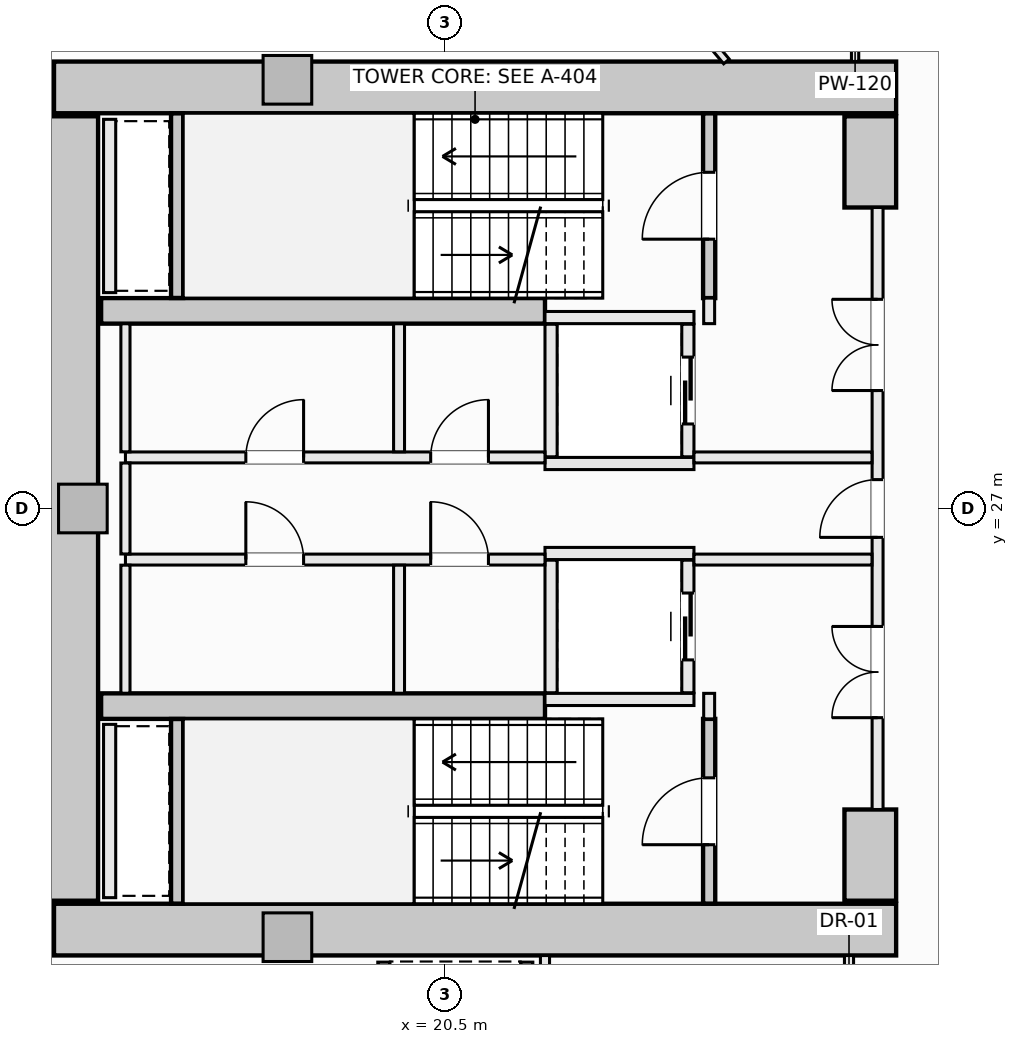
"""IFC4 building model, lengths in metres.
Left out: names, types, materials, properties, quantities, classifications, styles, units other than length and angle.
Written with IfcOpenShell. Run it as: python <this file> out.ifc"""

import sys

from ifc_helpers import new_model, si_unit, direction, frame, frame_2d, origin, origin_2d, place, context, subcontext, project, spatial, rectangle, extrude, element, fill, save


model = new_model("IFC4")
c1 = context("Model", 3, precision=1e-05, world=origin(), true_north=direction((0.0, 1.0)))
c2 = subcontext(c1, "Body", "Model", "MODEL_VIEW")
j1 = project(units=[si_unit("LENGTHUNIT", "METRE"), si_unit("PLANEANGLEUNIT", "RADIAN")], contexts=[c1])
p1 = place(None, origin())
s1 = spatial("IfcSite", under=j1, at=p1, CompositionType="ELEMENT")
p2 = place(p1, origin())
s2 = spatial("IfcBuilding", under=s1, at=p2, CompositionType="ELEMENT")
p3 = place(p2, frame((0.0, 0.0, 80.4)))
s3 = spatial("IfcBuildingStorey", under=s2, at=p3, CompositionType="ELEMENT", Elevation=80.4)
for number, where, z_axis, x_axis in (
    (1, (14.075, 33.925, -0.28), (0.0, 0.0, 1.0), (1.0, 0.0, 0.0)),
    (2, (14.075, 20.075, -0.28), (0.0, 0.0, 1.0), (1.0, 0.0, 0.0)),
):
    element("IfcWall", number, at=place(p3, frame(where, z_axis=z_axis, x_axis=x_axis)), inside=s3, PredefinedType="SHEAR", context=c2, shape_type="SweptSolid", body=[
        extrude(rectangle(XDim=13.85, YDim=0.85, at=frame_2d((6.925, 0.0))), origin(), (0.0, 0.0, 1.0), 3.85),
    ])
p4 = place(p3, frame((14.375, 20.55, -0.28), z_axis=(0.0, 0.0, 1.0), x_axis=(0.0, 1.0, 0.0)))
e3 = element("IfcWall", 3, at=p4, inside=s3, PredefinedType="SHEAR", context=c2, shape_type="SweptSolid", body=[
    extrude(rectangle(XDim=12.9, YDim=0.85, at=frame_2d((6.45, 0.0))), origin(), (0.0, 0.0, 1.0), 3.85),
])
for number, where, z_axis, x_axis in (
    (4, (27.5, 31.95, -0.28), (0.0, 0.0, 1.0), (0.0, 1.0, 0.0)),
    (5, (27.5, 20.55, -0.28), (0.0, 0.0, 1.0), (0.0, 1.0, 0.0)),
):
    element("IfcWall", number, at=place(p3, frame(where, z_axis=z_axis, x_axis=x_axis)), inside=s3, PredefinedType="SHEAR", context=c2, shape_type="SweptSolid", body=[
        extrude(rectangle(XDim=1.5, YDim=0.85, at=frame_2d((0.75, 0.0))), origin(), (0.0, 0.0, 1.0), 3.85),
    ])
for number, where, z_axis, x_axis in (
    (6, (14.85, 30.25, -0.28), (0.0, 0.0, 1.0), (1.0, 0.0, 0.0)),
    (7, (14.85, 23.75, -0.28), (0.0, 0.0, 1.0), (1.0, 0.0, 0.0)),
):
    element("IfcWall", number, at=place(p3, frame(where, z_axis=z_axis, x_axis=x_axis)), inside=s3, PredefinedType="SHEAR", context=c2, shape_type="SweptSolid", body=[
        extrude(rectangle(XDim=7.3, YDim=0.42, at=frame_2d((3.65, 0.0))), origin(), (0.0, 0.0, 1.0), 3.85),
    ])
for number, where, z_axis, x_axis in (
    (8, (17.914, 34.05, -0.28), (0.0, 0.0, 1.0), (1.0, 0.0, 0.0)),
    (9, (14.55, 27.0, -0.28), (0.0, 0.0, 1.0), (1.0, 0.0, 0.0)),
    (10, (17.914, 19.95, -0.28), (0.0, 0.0, 1.0), (1.0, 0.0, 0.0)),
):
    element("IfcColumn", number, at=place(p3, frame(where, z_axis=z_axis, x_axis=x_axis)), inside=s3, PredefinedType="PILASTER", context=c2, shape_type="SweptSolid", body=[
        extrude(rectangle(XDim=0.8, YDim=0.8, at=origin_2d()), origin(), (0.0, 0.0, 1.0), 3.85),
    ])
p5 = place(p3, frame((24.85, 30.46, -0.28), z_axis=(0.0, 0.0, 1.0), x_axis=(0.0, 1.0, 0.0)))
e11 = element("IfcWall", 11, at=p5, inside=s3, PredefinedType="SHEAR", context=c2, shape_type="SweptSolid", body=[
    extrude(rectangle(XDim=3.038, YDim=0.2, at=frame_2d((1.519, 0.0))), origin(), (0.0, 0.0, 1.0), 3.85),
])
p6 = place(p5, frame((0.969, 0.0, 0.28)))
e12 = element("IfcOpeningElement", 12, at=p6, cuts=e11, PredefinedType="OPENING", context=c2, shape_type="SweptSolid", body=[
    extrude(rectangle(XDim=1.1, YDim=2.15, at=frame_2d((0.55, 1.075))), frame((0.0, 0.11, 0.0), z_axis=(0.0, -1.0, 0.0), x_axis=(1.0, 0.0, 0.0)), (0.0, 0.0, 1.0), 0.22),
])
p7 = place(p3, frame((16.1, 30.462, -0.28), z_axis=(0.0, 0.0, 1.0), x_axis=(0.0, 1.0, 0.0)))
e13 = element("IfcWall", 13, at=p7, inside=s3, PredefinedType="SHEAR", context=c2, shape_type="SweptSolid", body=[
    extrude(rectangle(XDim=3.036, YDim=0.2, at=frame_2d((1.518, 0.0))), origin(), (0.0, 0.0, 1.0), 3.85),
])
p8 = place(p3, frame((24.85, 20.502, -0.28), z_axis=(0.0, 0.0, 1.0), x_axis=(0.0, 1.0, 0.0)))
e14 = element("IfcWall", 14, at=p8, inside=s3, PredefinedType="SHEAR", context=c2, shape_type="SweptSolid", body=[
    extrude(rectangle(XDim=3.038, YDim=0.2, at=frame_2d((1.519, 0.0))), origin(), (0.0, 0.0, 1.0), 3.85),
])
p9 = place(p8, frame((0.969, 0.0, 0.28)))
e15 = element("IfcOpeningElement", 15, at=p9, cuts=e14, PredefinedType="OPENING", context=c2, shape_type="SweptSolid", body=[
    extrude(rectangle(XDim=1.1, YDim=2.15, at=frame_2d((0.55, 1.075))), frame((0.0, 0.11, 0.0), z_axis=(0.0, -1.0, 0.0), x_axis=(1.0, 0.0, 0.0)), (0.0, 0.0, 1.0), 0.22),
])
p10 = place(p3, frame((16.1, 20.502, -0.28), z_axis=(0.0, 0.0, 1.0), x_axis=(0.0, 1.0, 0.0)))
e16 = element("IfcWall", 16, at=p10, inside=s3, PredefinedType="SHEAR", context=c2, shape_type="SweptSolid", body=[
    extrude(rectangle(XDim=3.036, YDim=0.2, at=frame_2d((1.518, 0.0))), origin(), (0.0, 0.0, 1.0), 3.85),
])
for number, where, z_axis, x_axis in (
    (17, (22.15, 30.14, 0.0), (0.0, 0.0, 1.0), (1.0, 0.0, 0.0)),
    (18, (22.15, 27.74, 0.0), (0.0, 0.0, 1.0), (1.0, 0.0, 0.0)),
):
    element("IfcWall", number, at=place(p3, frame(where, z_axis=z_axis, x_axis=x_axis)), inside=s3, PredefinedType="SOLIDWALL", context=c2, shape_type="SweptSolid", body=[
        extrude(rectangle(XDim=2.45, YDim=0.2, at=frame_2d((1.225, 0.0))), origin(), (0.0, 0.0, 1.0), 3.57),
    ])
p11 = place(p3, frame((22.25, 27.85, 0.0), z_axis=(0.0, 0.0, 1.0), x_axis=(0.0, 1.0, 0.0)))
e19 = element("IfcWall", 19, at=p11, inside=s3, PredefinedType="SOLIDWALL", context=c2, shape_type="SweptSolid", body=[
    extrude(rectangle(XDim=2.18, YDim=0.2, at=frame_2d((1.09, 0.0))), origin(), (0.0, 0.0, 1.0), 3.57),
])
p12 = place(p3, frame((24.5, 27.85, 0.0), z_axis=(0.0, 0.0, 1.0), x_axis=(0.0, 1.0, 0.0)))
e20 = element("IfcWall", 20, at=p12, inside=s3, PredefinedType="SOLIDWALL", context=c2, shape_type="SweptSolid", body=[
    extrude(rectangle(XDim=2.18, YDim=0.2, at=frame_2d((1.09, 0.0))), origin(), (0.0, 0.0, 1.0), 3.57),
])
p13 = place(p12, frame((0.54, 0.0, 0.0)))
e21 = element("IfcOpeningElement", 21, at=p13, cuts=e20, PredefinedType="OPENING", context=c2, shape_type="SweptSolid", body=[
    extrude(rectangle(XDim=1.1, YDim=2.2, at=frame_2d((0.55, 1.1))), frame((0.0, 0.11, 0.0), z_axis=(0.0, -1.0, 0.0), x_axis=(1.0, 0.0, 0.0)), (0.0, 0.0, 1.0), 0.22),
])
for number, where, z_axis, x_axis in (
    (22, (22.15, 26.26, 0.0), (0.0, 0.0, 1.0), (1.0, 0.0, 0.0)),
    (23, (22.15, 23.86, 0.0), (0.0, 0.0, 1.0), (1.0, 0.0, 0.0)),
):
    element("IfcWall", number, at=place(p3, frame(where, z_axis=z_axis, x_axis=x_axis)), inside=s3, PredefinedType="SOLIDWALL", context=c2, shape_type="SweptSolid", body=[
        extrude(rectangle(XDim=2.45, YDim=0.2, at=frame_2d((1.225, 0.0))), origin(), (0.0, 0.0, 1.0), 3.57),
    ])
p14 = place(p3, frame((22.25, 23.97, 0.0), z_axis=(0.0, 0.0, 1.0), x_axis=(0.0, 1.0, 0.0)))
e24 = element("IfcWall", 24, at=p14, inside=s3, PredefinedType="SOLIDWALL", context=c2, shape_type="SweptSolid", body=[
    extrude(rectangle(XDim=2.18, YDim=0.2, at=frame_2d((1.09, 0.0))), origin(), (0.0, 0.0, 1.0), 3.57),
])
p15 = place(p3, frame((24.5, 23.97, 0.0), z_axis=(0.0, 0.0, 1.0), x_axis=(0.0, 1.0, 0.0)))
e25 = element("IfcWall", 25, at=p15, inside=s3, PredefinedType="SOLIDWALL", context=c2, shape_type="SweptSolid", body=[
    extrude(rectangle(XDim=2.18, YDim=0.2, at=frame_2d((1.09, 0.0))), origin(), (0.0, 0.0, 1.0), 3.57),
])
p16 = place(p15, frame((0.54, 0.0, 0.0)))
e26 = element("IfcOpeningElement", 26, at=p16, cuts=e25, PredefinedType="OPENING", context=c2, shape_type="SweptSolid", body=[
    extrude(rectangle(XDim=1.1, YDim=2.2, at=frame_2d((0.55, 1.1))), frame((0.0, 0.11, 0.0), z_axis=(0.0, -1.0, 0.0), x_axis=(1.0, 0.0, 0.0)), (0.0, 0.0, 1.0), 0.22),
])
for number, where, z_axis, x_axis in (
    (27, (19.5, 17.01, 0.0), (0.0, 0.0, 1.0), (0.0, 1.0, 0.0)),
    (28, (21.85, 17.01, 0.0), (0.0, 0.0, 1.0), (0.0, 1.0, 0.0)),
):
    element("IfcWall", number, at=place(p3, frame(where, z_axis=z_axis, x_axis=x_axis)), inside=s3, PredefinedType="SOLIDWALL", context=c2, shape_type="SweptSolid", body=[
        extrude(rectangle(XDim=2.53, YDim=0.2, at=frame_2d((1.265, 0.0))), origin(), (0.0, 0.0, 1.0), 3.57),
    ])
for number, where, z_axis, x_axis in (
    (29, (14.99, 30.55, 0.0), (0.0, 0.0, 1.0), (0.0, 1.0, 0.0)),
    (30, (14.99, 20.6, 0.0), (0.0, 0.0, 1.0), (0.0, 1.0, 0.0)),
):
    element("IfcWall", number, at=place(p3, frame(where, z_axis=z_axis, x_axis=x_axis)), inside=s3, PredefinedType="SOLIDWALL", context=c2, shape_type="SweptSolid", body=[
        extrude(rectangle(XDim=2.85, YDim=0.2, at=frame_2d((1.425, 0.0))), origin(), (0.0, 0.0, 1.0), 3.57),
    ])
for number, where, z_axis, x_axis in (
    (31, (24.85, 23.54, 0.0), (0.0, 0.0, 1.0), (0.0, 1.0, 0.0)),
    (32, (24.85, 30.04, 0.0), (0.0, 0.0, 1.0), (0.0, 1.0, 0.0)),
):
    element("IfcWall", number, at=place(p3, frame(where, z_axis=z_axis, x_axis=x_axis)), inside=s3, PredefinedType="SOLIDWALL", context=c2, shape_type="SweptSolid", body=[
        extrude(rectangle(XDim=0.42, YDim=0.18, at=frame_2d((0.21, 0.0))), origin(), (0.0, 0.0, 1.0), 3.57),
    ])
p17 = place(p3, frame((27.62, 22.05, 0.0), z_axis=(0.0, 0.0, 1.0), x_axis=(0.0, 1.0, 0.0)))
e33 = element("IfcWall", 33, at=p17, inside=s3, PredefinedType="SOLIDWALL", context=c2, shape_type="SweptSolid", body=[
    extrude(rectangle(XDim=9.9, YDim=0.18, at=frame_2d((4.95, 0.0))), origin(), (0.0, 0.0, 1.0), 2.662),
])
p18 = place(p17, frame((4.475, 0.0, 0.0)))
e34 = element("IfcOpeningElement", 34, at=p18, cuts=e33, PredefinedType="OPENING", context=c2, shape_type="SweptSolid", body=[
    extrude(rectangle(XDim=0.95, YDim=2.1, at=frame_2d((0.475, 1.05))), frame((0.0, 0.1, 0.0), z_axis=(0.0, -1.0, 0.0), x_axis=(1.0, 0.0, 0.0)), (0.0, 0.0, 1.0), 0.2),
])
p19 = place(p17, frame((6.89, 0.0, 0.0)))
e35 = element("IfcOpeningElement", 35, at=p19, cuts=e33, PredefinedType="OPENING", context=c2, shape_type="SweptSolid", body=[
    extrude(rectangle(XDim=1.5, YDim=2.2, at=frame_2d((0.75, 1.1))), frame((0.0, 0.1, 0.0), z_axis=(0.0, -1.0, 0.0), x_axis=(1.0, 0.0, 0.0)), (0.0, 0.0, 1.0), 0.2),
])
p20 = place(p17, frame((1.51, 0.0, 0.0)))
e36 = element("IfcOpeningElement", 36, at=p20, cuts=e33, PredefinedType="OPENING", context=c2, shape_type="SweptSolid", body=[
    extrude(rectangle(XDim=1.5, YDim=2.2, at=frame_2d((0.75, 1.1))), frame((0.0, 0.1, 0.0), z_axis=(0.0, -1.0, 0.0), x_axis=(1.0, 0.0, 0.0)), (0.0, 0.0, 1.0), 0.2),
])
p21 = place(p3, frame((15.25, 27.84, 0.0), z_axis=(0.0, 0.0, 1.0), x_axis=(1.0, 0.0, 0.0)))
e37 = element("IfcWall", 37, at=p21, inside=s3, PredefinedType="SOLIDWALL", context=c2, shape_type="SweptSolid", body=[
    extrude(rectangle(XDim=6.9, YDim=0.18, at=frame_2d((3.45, 0.0))), origin(), (0.0, 0.0, 1.0), 3.57),
])
p22 = place(p21, frame((5.02, 0.0, 0.0)))
e38 = element("IfcOpeningElement", 38, at=p22, cuts=e37, PredefinedType="OPENING", context=c2, shape_type="SweptSolid", body=[
    extrude(rectangle(XDim=0.95, YDim=2.1, at=frame_2d((0.475, 1.05))), frame((0.0, 0.1, 0.0), z_axis=(0.0, -1.0, 0.0), x_axis=(1.0, 0.0, 0.0)), (0.0, 0.0, 1.0), 0.2),
])
p23 = place(p21, frame((1.98, 0.0, 0.0)))
e39 = element("IfcOpeningElement", 39, at=p23, cuts=e37, PredefinedType="OPENING", context=c2, shape_type="SweptSolid", body=[
    extrude(rectangle(XDim=0.95, YDim=2.1, at=frame_2d((0.475, 1.05))), frame((0.0, 0.1, 0.0), z_axis=(0.0, -1.0, 0.0), x_axis=(1.0, 0.0, 0.0)), (0.0, 0.0, 1.0), 0.2),
])
p24 = place(p3, frame((24.6, 27.84, 0.0), z_axis=(0.0, 0.0, 1.0), x_axis=(1.0, 0.0, 0.0)))
e40 = element("IfcWall", 40, at=p24, inside=s3, PredefinedType="SOLIDWALL", context=c2, shape_type="SweptSolid", body=[
    extrude(rectangle(XDim=2.928, YDim=0.18, at=frame_2d((1.464, 0.0))), origin(), (0.0, 0.0, 1.0), 3.57),
])
p25 = place(p3, frame((15.25, 26.16, 0.0), z_axis=(0.0, 0.0, 1.0), x_axis=(1.0, 0.0, 0.0)))
e41 = element("IfcWall", 41, at=p25, inside=s3, PredefinedType="SOLIDWALL", context=c2, shape_type="SweptSolid", body=[
    extrude(rectangle(XDim=6.9, YDim=0.18, at=frame_2d((3.45, 0.0))), origin(), (0.0, 0.0, 1.0), 3.57),
])
p26 = place(p25, frame((5.02, 0.0, 0.0)))
e42 = element("IfcOpeningElement", 42, at=p26, cuts=e41, PredefinedType="OPENING", context=c2, shape_type="SweptSolid", body=[
    extrude(rectangle(XDim=0.95, YDim=2.1, at=frame_2d((0.475, 1.05))), frame((0.0, 0.1, 0.0), z_axis=(0.0, -1.0, 0.0), x_axis=(1.0, 0.0, 0.0)), (0.0, 0.0, 1.0), 0.2),
])
p27 = place(p25, frame((1.98, 0.0, 0.0)))
e43 = element("IfcOpeningElement", 43, at=p27, cuts=e41, PredefinedType="OPENING", context=c2, shape_type="SweptSolid", body=[
    extrude(rectangle(XDim=0.95, YDim=2.1, at=frame_2d((0.475, 1.05))), frame((0.0, 0.1, 0.0), z_axis=(0.0, -1.0, 0.0), x_axis=(1.0, 0.0, 0.0)), (0.0, 0.0, 1.0), 0.2),
])
p28 = place(p3, frame((24.6, 26.16, 0.0), z_axis=(0.0, 0.0, 1.0), x_axis=(1.0, 0.0, 0.0)))
e44 = element("IfcWall", 44, at=p28, inside=s3, PredefinedType="SOLIDWALL", context=c2, shape_type="SweptSolid", body=[
    extrude(rectangle(XDim=2.928, YDim=0.18, at=frame_2d((1.464, 0.0))), origin(), (0.0, 0.0, 1.0), 3.57),
])
p29 = place(p3, frame((15.25, 23.962, 0.0), z_axis=(0.0, 0.0, 1.0), x_axis=(0.0, 1.0, 0.0)))
e45 = element("IfcWall", 45, at=p29, inside=s3, PredefinedType="PARTITIONING", context=c2, shape_type="SweptSolid", body=[
    extrude(rectangle(XDim=2.106, YDim=0.15, at=frame_2d((1.053, 0.0))), origin(), (0.0, 0.0, 1.0), 3.57),
])
p30 = place(p3, frame((15.25, 26.252, 0.0), z_axis=(0.0, 0.0, 1.0), x_axis=(0.0, 1.0, 0.0)))
e46 = element("IfcWall", 46, at=p30, inside=s3, PredefinedType="PARTITIONING", context=c2, shape_type="SweptSolid", body=[
    extrude(rectangle(XDim=1.496, YDim=0.15, at=frame_2d((0.748, 0.0))), origin(), (0.0, 0.0, 1.0), 3.57),
])
p31 = place(p3, frame((15.25, 27.932, 0.0), z_axis=(0.0, 0.0, 1.0), x_axis=(0.0, 1.0, 0.0)))
e47 = element("IfcWall", 47, at=p31, inside=s3, PredefinedType="PARTITIONING", context=c2, shape_type="SweptSolid", body=[
    extrude(rectangle(XDim=2.106, YDim=0.15, at=frame_2d((1.053, 0.0))), origin(), (0.0, 0.0, 1.0), 3.57),
])
for number, where, z_axis, x_axis in (
    (48, (19.75, 23.962, 0.0), (0.0, 0.0, 1.0), (0.0, 1.0, 0.0)),
    (49, (19.75, 27.932, 0.0), (0.0, 0.0, 1.0), (0.0, 1.0, 0.0)),
):
    element("IfcWall", number, at=place(p3, frame(where, z_axis=z_axis, x_axis=x_axis)), inside=s3, PredefinedType="SOLIDWALL", context=c2, shape_type="SweptSolid", body=[
        extrude(rectangle(XDim=2.106, YDim=0.18, at=frame_2d((1.053, 0.0))), origin(), (0.0, 0.0, 1.0), 3.57),
    ])
p32 = place(p3, frame((22.15, 17.127, 0.0), z_axis=(0.0, 0.0, 1.0), x_axis=(0.0, 1.0, 0.0)))
e50 = element("IfcWall", 50, at=p32, inside=s3, PredefinedType="PARTITIONING", context=c2, shape_type="SweptSolid", body=[
    extrude(rectangle(XDim=2.521, YDim=0.15, at=frame_2d((1.26, 0.0))), origin(), (0.0, 0.0, 1.0), 3.57),
])
p33 = place(p3, frame((27.15, 17.127, 0.0), z_axis=(0.0, 0.0, 1.0), x_axis=(0.0, 1.0, 0.0)))
e51 = element("IfcWall", 51, at=p33, inside=s3, PredefinedType="PARTITIONING", context=c2, shape_type="SweptSolid", body=[
    extrude(rectangle(XDim=2.521, YDim=0.15, at=frame_2d((1.26, 0.0))), origin(), (0.0, 0.0, 1.0), 3.57),
])
p34 = place(p33, frame((0.785, 0.0, 0.0)))
e52 = element("IfcOpeningElement", 52, at=p34, cuts=e51, PredefinedType="OPENING", context=c2, shape_type="SweptSolid", body=[
    extrude(rectangle(XDim=0.95, YDim=2.1, at=frame_2d((0.475, 1.05))), frame((0.0, 0.085, 0.0), z_axis=(0.0, -1.0, 0.0), x_axis=(1.0, 0.0, 0.0)), (0.0, 0.0, 1.0), 0.17),
])
p35 = place(p3, frame((27.25, 34.352, 0.0), z_axis=(0.0, 0.0, 1.0), x_axis=(0.0, 1.0, 0.0)))
e53 = element("IfcWall", 53, at=p35, inside=s3, PredefinedType="PARTITIONING", context=c2, shape_type="SweptSolid", body=[
    extrude(rectangle(XDim=0.606, YDim=0.12, at=frame_2d((0.303, 0.0))), origin(), (0.0, 0.0, 1.0), 3.57),
])
p36 = place(p3, frame((24.626, 34.958, 0.0), z_axis=(0.0, 0.0, 1.0), x_axis=(0.643032873298, -0.765838575588, 0.0)))
e54 = element("IfcWall", 54, at=p36, inside=s3, PredefinedType="PARTITIONING", context=c2, shape_type="SweptSolid", body=[
    extrude(rectangle(XDim=0.791, YDim=0.12, at=frame_2d((0.396, 0.0))), origin(), (0.0, 0.0, 1.0), 3.57),
])
p37 = place(p6, origin())
e55 = element("IfcDoor", 55, at=p37, inside=s3, OperationType="SINGLE_SWING_LEFT", PredefinedType="DOOR", context=c2, shape_type="SweptSolid", body=[
    extrude(rectangle(XDim=1.1, YDim=2.15, at=frame_2d((0.55, 1.075))), frame((0.0, 0.025, 0.0), z_axis=(0.0, -1.0, 0.0), x_axis=(1.0, 0.0, 0.0)), (0.0, 0.0, 1.0), 0.05),
])
fill(e12, e55)
p38 = place(p9, origin())
e56 = element("IfcDoor", 56, at=p38, inside=s3, OperationType="SINGLE_SWING_LEFT", PredefinedType="DOOR", context=c2, shape_type="SweptSolid", body=[
    extrude(rectangle(XDim=1.1, YDim=2.15, at=frame_2d((0.55, 1.075))), frame((0.0, 0.025, 0.0), z_axis=(0.0, -1.0, 0.0), x_axis=(1.0, 0.0, 0.0)), (0.0, 0.0, 1.0), 0.05),
])
fill(e15, e56)
p39 = place(p13, origin())
e57 = element("IfcDoor", 57, at=p39, inside=s3, OperationType="SLIDING_TO_LEFT", PredefinedType="DOOR", context=c2, shape_type="SweptSolid", body=[
    extrude(rectangle(XDim=1.1, YDim=2.2, at=frame_2d((0.55, 1.1))), frame((0.0, 0.025, 0.0), z_axis=(0.0, -1.0, 0.0), x_axis=(1.0, 0.0, 0.0)), (0.0, 0.0, 1.0), 0.05),
])
fill(e21, e57)
p40 = place(p16, origin())
e58 = element("IfcDoor", 58, at=p40, inside=s3, OperationType="SLIDING_TO_LEFT", PredefinedType="DOOR", context=c2, shape_type="SweptSolid", body=[
    extrude(rectangle(XDim=1.1, YDim=2.2, at=frame_2d((0.55, 1.1))), frame((0.0, 0.025, 0.0), z_axis=(0.0, -1.0, 0.0), x_axis=(1.0, 0.0, 0.0)), (0.0, 0.0, 1.0), 0.05),
])
fill(e26, e58)
p41 = place(p18, origin())
e59 = element("IfcDoor", 59, at=p41, inside=s3, OperationType="SINGLE_SWING_LEFT", PredefinedType="DOOR", context=c2, shape_type="SweptSolid", body=[
    extrude(rectangle(XDim=0.95, YDim=2.1, at=frame_2d((0.475, 1.05))), frame((0.0, 0.025, 0.0), z_axis=(0.0, -1.0, 0.0), x_axis=(1.0, 0.0, 0.0)), (0.0, 0.0, 1.0), 0.05),
])
fill(e34, e59)
p42 = place(p19, origin())
e60 = element("IfcDoor", 60, at=p42, inside=s3, OperationType="DOUBLE_DOOR_SINGLE_SWING", PredefinedType="DOOR", context=c2, shape_type="SweptSolid", body=[
    extrude(rectangle(XDim=1.5, YDim=2.2, at=frame_2d((0.75, 1.1))), frame((0.0, 0.025, 0.0), z_axis=(0.0, -1.0, 0.0), x_axis=(1.0, 0.0, 0.0)), (0.0, 0.0, 1.0), 0.05),
])
fill(e35, e60)
p43 = place(p20, origin())
e61 = element("IfcDoor", 61, at=p43, inside=s3, OperationType="DOUBLE_DOOR_SINGLE_SWING", PredefinedType="DOOR", context=c2, shape_type="SweptSolid", body=[
    extrude(rectangle(XDim=1.5, YDim=2.2, at=frame_2d((0.75, 1.1))), frame((0.0, 0.025, 0.0), z_axis=(0.0, -1.0, 0.0), x_axis=(1.0, 0.0, 0.0)), (0.0, 0.0, 1.0), 0.05),
])
fill(e36, e61)
p44 = place(p22, origin())
e62 = element("IfcDoor", 62, at=p44, inside=s3, OperationType="SINGLE_SWING_RIGHT", PredefinedType="DOOR", context=c2, shape_type="SweptSolid", body=[
    extrude(rectangle(XDim=0.95, YDim=2.1, at=frame_2d((0.475, 1.05))), frame((0.0, 0.025, 0.0), z_axis=(0.0, -1.0, 0.0), x_axis=(1.0, 0.0, 0.0)), (0.0, 0.0, 1.0), 0.05),
])
fill(e38, e62)
p45 = place(p26, origin())
e63 = element("IfcDoor", 63, at=p45, inside=s3, OperationType="SINGLE_SWING_LEFT", PredefinedType="DOOR", context=c2, shape_type="SweptSolid", body=[
    extrude(rectangle(XDim=0.95, YDim=2.1, at=frame_2d((0.475, 1.05))), frame((0.0, 0.025, 0.0), z_axis=(0.0, -1.0, 0.0), x_axis=(1.0, 0.0, 0.0)), (0.0, 0.0, 1.0), 0.05),
])
fill(e42, e63)
p46 = place(p23, origin())
e64 = element("IfcDoor", 64, at=p46, inside=s3, OperationType="SINGLE_SWING_RIGHT", PredefinedType="DOOR", context=c2, shape_type="SweptSolid", body=[
    extrude(rectangle(XDim=0.95, YDim=2.1, at=frame_2d((0.475, 1.05))), frame((0.0, 0.025, 0.0), z_axis=(0.0, -1.0, 0.0), x_axis=(1.0, 0.0, 0.0)), (0.0, 0.0, 1.0), 0.05),
])
fill(e39, e64)
p47 = place(p27, origin())
e65 = element("IfcDoor", 65, at=p47, inside=s3, OperationType="SINGLE_SWING_LEFT", PredefinedType="DOOR", context=c2, shape_type="SweptSolid", body=[
    extrude(rectangle(XDim=0.95, YDim=2.1, at=frame_2d((0.475, 1.05))), frame((0.0, 0.025, 0.0), z_axis=(0.0, -1.0, 0.0), x_axis=(1.0, 0.0, 0.0)), (0.0, 0.0, 1.0), 0.05),
])
fill(e43, e65)
save(model, sys.argv[1])
